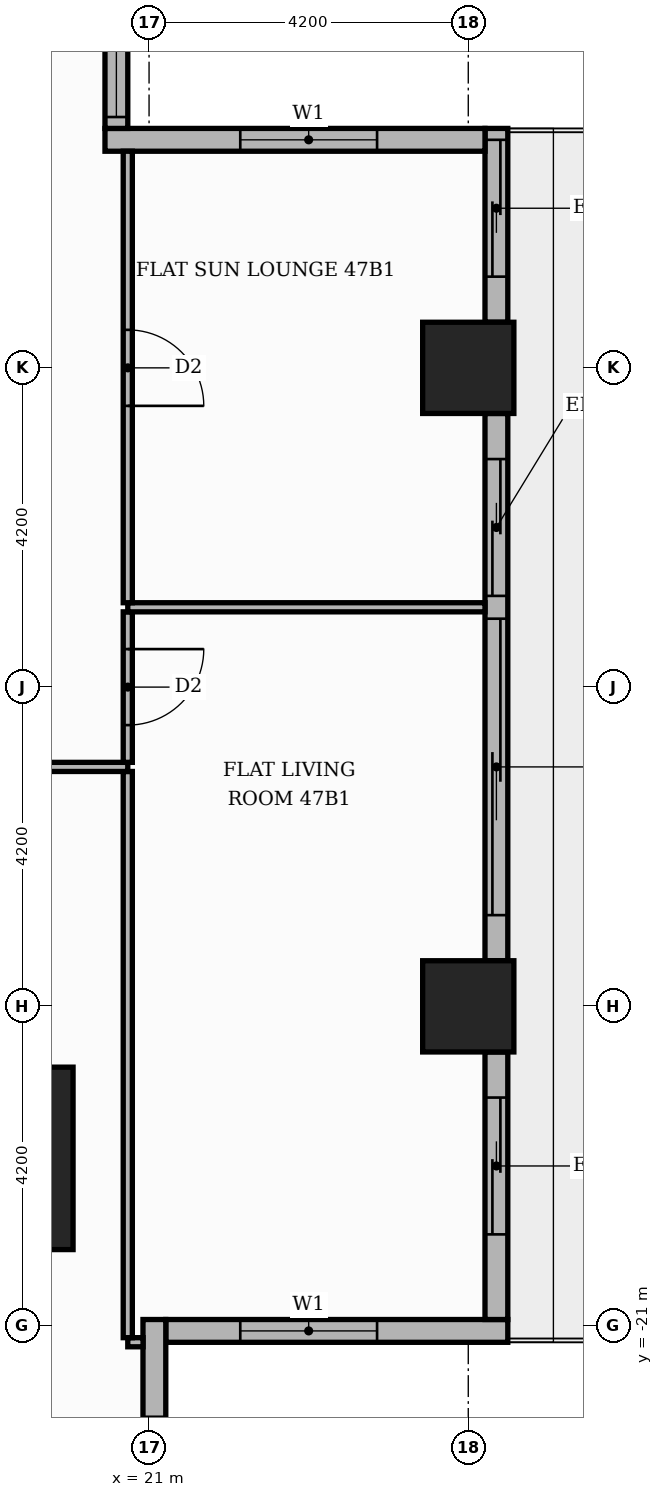
"""IFC4 building model, lengths in metres.
Left out: names, types, materials, properties, quantities, classifications, styles, units other than length and angle.
Written with IfcOpenShell. Run it as: python <this file> out.ifc"""

import sys

from ifc_helpers import new_model, si_unit, direction, frame, frame_2d, origin, origin_2d, place, context, subcontext, project, spatial, rectangle, extrude, element, fill, save


model = new_model("IFC4")
c1 = context("Model", 3, precision=1e-05, world=origin(), true_north=direction((0.0, 1.0)))
c2 = subcontext(c1, "Body", "Model", "MODEL_VIEW")
j1 = project(units=[si_unit("LENGTHUNIT", "METRE"), si_unit("PLANEANGLEUNIT", "RADIAN")], contexts=[c1])
p1 = place(None, origin())
s1 = spatial("IfcSite", under=j1, at=p1, CompositionType="ELEMENT")
p2 = place(p1, origin())
s2 = spatial("IfcBuilding", under=s1, at=p2, CompositionType="ELEMENT")
p3 = place(p2, frame((0.0, 0.0, 200.1)))
s3 = spatial("IfcBuildingStorey", under=s2, at=p3, CompositionType="ELEMENT", Elevation=200.1)
p4 = place(p3, frame((18.8, -18.8, 0.0), z_axis=(0.0, 0.0, 1.0), x_axis=(1.0, 0.0, 0.0)))
e1 = element("IfcColumn", 1, at=p4, inside=s3, PredefinedType="COLUMN", context=c2, shape_type="SweptSolid", body=[
    extrude(rectangle(XDim=2.4, YDim=2.4, at=origin_2d()), origin(), (0.0, 0.0, 1.0), 3.9),
])
for number, where, z_axis, x_axis in (
    (2, (25.2, -8.4, 0.0), (0.0, 0.0, 1.0), (1.0, 0.0, 0.0)),
    (3, (25.2, -16.8, 0.0), (0.0, 0.0, 1.0), (1.0, 0.0, 0.0)),
):
    element("IfcColumn", number, at=place(p3, frame(where, z_axis=z_axis, x_axis=x_axis)), inside=s3, PredefinedType="COLUMN", context=c2, shape_type="SweptSolid", body=[
        extrude(rectangle(XDim=1.2, YDim=1.2, at=origin_2d()), origin(), (0.0, 0.0, 1.0), 3.9),
    ])
p5 = place(p3, frame((21.22, -21.07, 0.0), z_axis=(0.0, 0.0, 1.0), x_axis=(1.0, 0.0, 0.0)))
e4 = element("IfcWall", 4, at=p5, inside=s3, PredefinedType="STANDARD", context=c2, shape_type="SweptSolid", body=[
    extrude(rectangle(XDim=4.5, YDim=0.3, at=frame_2d((2.25, 0.0))), origin(), (0.0, 0.0, 1.0), 3.48),
])
p6 = place(p5, frame((0.98, 0.0, 0.9)))
e5 = element("IfcOpeningElement", 5, at=p6, cuts=e4, PredefinedType="OPENING", context=c2, shape_type="SweptSolid", body=[
    extrude(rectangle(XDim=1.8, YDim=2.1, at=frame_2d((0.9, 1.05))), frame((0.0, 0.16, 0.0), z_axis=(0.0, -1.0, 0.0), x_axis=(1.0, 0.0, 0.0)), (0.0, 0.0, 1.0), 0.32),
])
p7 = place(p3, frame((25.57, -20.92, 0.0), z_axis=(0.0, 0.0, 1.0), x_axis=(0.0, 1.0, 0.0)))
e6 = element("IfcWall", 6, at=p7, inside=s3, PredefinedType="STANDARD", context=c2, shape_type="SweptSolid", body=[
    extrude(rectangle(XDim=3.52, YDim=0.3, at=frame_2d((1.76, 0.0))), origin(), (0.0, 0.0, 1.0), 3.48),
])
p8 = place(p7, frame((1.12, 0.0, 0.0)))
e7 = element("IfcOpeningElement", 7, at=p8, cuts=e6, PredefinedType="OPENING", context=c2, shape_type="SweptSolid", body=[
    extrude(rectangle(XDim=1.8, YDim=2.4, at=frame_2d((0.9, 1.2))), frame((0.0, 0.16, 0.0), z_axis=(0.0, -1.0, 0.0), x_axis=(1.0, 0.0, 0.0)), (0.0, 0.0, 1.0), 0.32),
])
p9 = place(p3, frame((25.57, -16.2, 0.0), z_axis=(0.0, 0.0, 1.0), x_axis=(0.0, 1.0, 0.0)))
e8 = element("IfcWall", 8, at=p9, inside=s3, PredefinedType="STANDARD", context=c2, shape_type="SweptSolid", body=[
    extrude(rectangle(XDim=7.2, YDim=0.3, at=frame_2d((3.6, 0.0))), origin(), (0.0, 0.0, 1.0), 3.48),
])
p10 = place(p9, frame((0.6, 0.0, 0.0)))
e9 = element("IfcOpeningElement", 9, at=p10, cuts=e8, PredefinedType="OPENING", context=c2, shape_type="SweptSolid", body=[
    extrude(rectangle(XDim=3.9, YDim=2.4, at=frame_2d((1.95, 1.2))), frame((0.0, 0.16, 0.0), z_axis=(0.0, -1.0, 0.0), x_axis=(1.0, 0.0, 0.0)), (0.0, 0.0, 1.0), 0.32),
])
p11 = place(p9, frame((4.8, 0.0, 0.0)))
e10 = element("IfcOpeningElement", 10, at=p11, cuts=e8, PredefinedType="OPENING", context=c2, shape_type="SweptSolid", body=[
    extrude(rectangle(XDim=1.8, YDim=2.4, at=frame_2d((0.9, 1.2))), frame((0.0, 0.16, 0.0), z_axis=(0.0, -1.0, 0.0), x_axis=(1.0, 0.0, 0.0)), (0.0, 0.0, 1.0), 0.32),
])
p12 = place(p3, frame((25.57, -7.8, 0.0), z_axis=(0.0, 0.0, 1.0), x_axis=(0.0, 1.0, 0.0)))
e11 = element("IfcWall", 11, at=p12, inside=s3, PredefinedType="STANDARD", context=c2, shape_type="SweptSolid", body=[
    extrude(rectangle(XDim=2.55, YDim=0.3, at=frame_2d((1.275, 0.0))), origin(), (0.0, 0.0, 1.0), 3.48),
])
p13 = place(p12, frame((0.6, 0.0, 0.0)))
e12 = element("IfcOpeningElement", 12, at=p13, cuts=e11, PredefinedType="OPENING", context=c2, shape_type="SweptSolid", body=[
    extrude(rectangle(XDim=1.8, YDim=2.4, at=frame_2d((0.9, 1.2))), frame((0.0, 0.16, 0.0), z_axis=(0.0, -1.0, 0.0), x_axis=(1.0, 0.0, 0.0)), (0.0, 0.0, 1.0), 0.32),
])
p14 = place(p3, frame((25.42, -5.4, 0.0), z_axis=(0.0, 0.0, 1.0), x_axis=(-1.0, 0.0, 0.0)))
e13 = element("IfcWall", 13, at=p14, inside=s3, PredefinedType="STANDARD", context=c2, shape_type="SweptSolid", body=[
    extrude(rectangle(XDim=5.0, YDim=0.3, at=frame_2d((2.5, 0.0))), origin(), (0.0, 0.0, 1.0), 3.48),
])
p15 = place(p14, frame((1.42, 0.0, 0.9)))
e14 = element("IfcOpeningElement", 14, at=p15, cuts=e13, PredefinedType="OPENING", context=c2, shape_type="SweptSolid", body=[
    extrude(rectangle(XDim=1.8, YDim=2.1, at=frame_2d((0.9, 1.05))), frame((0.0, 0.16, 0.0), z_axis=(0.0, -1.0, 0.0), x_axis=(1.0, 0.0, 0.0)), (0.0, 0.0, 1.0), 0.32),
])
p16 = place(p3, frame((20.57, -5.25, 0.0), z_axis=(0.0, 0.0, 1.0), x_axis=(0.0, 1.0, 0.0)))
e15 = element("IfcWall", 15, at=p16, inside=s3, PredefinedType="STANDARD", context=c2, shape_type="SweptSolid", body=[
    extrude(rectangle(XDim=10.8, YDim=0.3, at=frame_2d((5.4, 0.0))), origin(), (0.0, 0.0, 1.0), 3.48),
])
p17 = place(p16, frame((0.15, 0.0, 0.9)))
e16 = element("IfcOpeningElement", 16, at=p17, cuts=e15, PredefinedType="OPENING", context=c2, shape_type="SweptSolid", body=[
    extrude(rectangle(XDim=6.0, YDim=2.1, at=frame_2d((3.0, 1.05))), frame((0.0, 0.16, 0.0), z_axis=(0.0, -1.0, 0.0), x_axis=(1.0, 0.0, 0.0)), (0.0, 0.0, 1.0), 0.32),
])
p18 = place(p16, frame((6.45, 0.0, 0.9)))
e17 = element("IfcOpeningElement", 17, at=p18, cuts=e15, PredefinedType="OPENING", context=c2, shape_type="SweptSolid", body=[
    extrude(rectangle(XDim=3.9, YDim=2.1, at=frame_2d((1.95, 1.05))), frame((0.0, 0.16, 0.0), z_axis=(0.0, -1.0, 0.0), x_axis=(1.0, 0.0, 0.0)), (0.0, 0.0, 1.0), 0.32),
])
p19 = place(p3, frame((21.07, -25.42, 0.0), z_axis=(0.0, 0.0, 1.0), x_axis=(0.0, 1.0, 0.0)))
e18 = element("IfcWall", 18, at=p19, inside=s3, PredefinedType="STANDARD", context=c2, shape_type="SweptSolid", body=[
    extrude(rectangle(XDim=4.5, YDim=0.3, at=frame_2d((2.25, 0.0))), origin(), (0.0, 0.0, 1.0), 3.48),
])
p20 = place(p19, frame((1.42, 0.0, 0.9)))
e19 = element("IfcOpeningElement", 19, at=p20, cuts=e18, PredefinedType="OPENING", context=c2, shape_type="SweptSolid", body=[
    extrude(rectangle(XDim=1.8, YDim=2.1, at=frame_2d((0.9, 1.05))), frame((0.0, 0.16, 0.0), z_axis=(0.0, -1.0, 0.0), x_axis=(1.0, 0.0, 0.0)), (0.0, 0.0, 1.0), 0.32),
])
p21 = place(p3, frame((20.72, -21.219, 0.0), z_axis=(0.0, 0.0, 1.0), x_axis=(1.0, 0.0, 0.0)))
e20 = element("IfcWall", 20, at=p21, inside=s3, PredefinedType="PARTITIONING", context=c2, shape_type="SweptSolid", body=[
    extrude(rectangle(XDim=0.201, YDim=0.12, at=frame_2d((0.101, 0.0))), origin(), (0.0, 0.0, 1.0), 3.48),
])
p22 = place(p3, frame((20.72, -21.159, 0.0), z_axis=(0.0, 0.0, 1.0), x_axis=(0.0, 1.0, 0.0)))
e21 = element("IfcWall", 21, at=p22, inside=s3, PredefinedType="PARTITIONING", context=c2, shape_type="SweptSolid", body=[
    extrude(rectangle(XDim=7.449, YDim=0.12, at=frame_2d((3.725, 0.0))), origin(), (0.0, 0.0, 1.0), 3.48),
])
p23 = place(p3, frame((13.65, -13.65, 0.0), z_axis=(0.0, 0.0, 1.0), x_axis=(1.0, 0.0, 0.0)))
e22 = element("IfcWall", 22, at=p23, inside=s3, PredefinedType="PARTITIONING", context=c2, shape_type="SweptSolid", body=[
    extrude(rectangle(XDim=7.07, YDim=0.12, at=frame_2d((3.535, 0.0))), origin(), (0.0, 0.0, 1.0), 3.48),
])
p24 = place(p23, frame((3.085, 0.0, 0.0)))
e23 = element("IfcOpeningElement", 23, at=p24, cuts=e22, PredefinedType="OPENING", context=c2, shape_type="SweptSolid", body=[
    extrude(rectangle(XDim=0.9, YDim=2.1, at=frame_2d((0.45, 1.05))), frame((0.0, 0.07, 0.0), z_axis=(0.0, -1.0, 0.0), x_axis=(1.0, 0.0, 0.0)), (0.0, 0.0, 1.0), 0.14),
])
p25 = place(p3, frame((20.72, -13.59, 0.0), z_axis=(0.0, 0.0, 1.0), x_axis=(0.0, 1.0, 0.0)))
e24 = element("IfcWall", 24, at=p25, inside=s3, PredefinedType="PARTITIONING", context=c2, shape_type="SweptSolid", body=[
    extrude(rectangle(XDim=1.98, YDim=0.12, at=frame_2d((0.99, 0.0))), origin(), (0.0, 0.0, 1.0), 3.48),
])
p26 = place(p25, frame((0.49, 0.0, 0.0)))
e25 = element("IfcOpeningElement", 25, at=p26, cuts=e24, PredefinedType="OPENING", context=c2, shape_type="SweptSolid", body=[
    extrude(rectangle(XDim=1.0, YDim=2.1, at=frame_2d((0.5, 1.05))), frame((0.0, 0.07, 0.0), z_axis=(0.0, -1.0, 0.0), x_axis=(1.0, 0.0, 0.0)), (0.0, 0.0, 1.0), 0.14),
])
p27 = place(p3, frame((20.72, -11.55, 0.0), z_axis=(0.0, 0.0, 1.0), x_axis=(1.0, 0.0, 0.0)))
e26 = element("IfcWall", 26, at=p27, inside=s3, PredefinedType="PARTITIONING", context=c2, shape_type="SweptSolid", body=[
    extrude(rectangle(XDim=4.7, YDim=0.12, at=frame_2d((2.35, 0.0))), origin(), (0.0, 0.0, 1.0), 3.48),
])
p28 = place(p3, frame((20.72, -11.49, 0.0), z_axis=(0.0, 0.0, 1.0), x_axis=(0.0, 1.0, 0.0)))
e27 = element("IfcWall", 27, at=p28, inside=s3, PredefinedType="PARTITIONING", context=c2, shape_type="SweptSolid", body=[
    extrude(rectangle(XDim=5.94, YDim=0.12, at=frame_2d((2.97, 0.0))), origin(), (0.0, 0.0, 1.0), 3.48),
])
p29 = place(p28, frame((2.59, 0.0, 0.0)))
e28 = element("IfcOpeningElement", 28, at=p29, cuts=e27, PredefinedType="OPENING", context=c2, shape_type="SweptSolid", body=[
    extrude(rectangle(XDim=1.0, YDim=2.1, at=frame_2d((0.5, 1.05))), frame((0.0, 0.07, 0.0), z_axis=(0.0, -1.0, 0.0), x_axis=(1.0, 0.0, 0.0)), (0.0, 0.0, 1.0), 0.14),
])
p30 = place(p6, origin())
e29 = element("IfcWindow", 29, at=p30, inside=s3, PartitioningType="SINGLE_PANEL", PredefinedType="WINDOW", context=c2, shape_type="SweptSolid", body=[
    extrude(rectangle(XDim=1.8, YDim=2.1, at=frame_2d((0.9, 1.05))), frame((0.0, 0.03, 0.0), z_axis=(0.0, -1.0, 0.0), x_axis=(1.0, 0.0, 0.0)), (0.0, 0.0, 1.0), 0.06),
])
fill(e5, e29)
p31 = place(p8, origin())
e30 = element("IfcDoor", 30, at=p31, inside=s3, OperationType="SLIDING_TO_RIGHT", PredefinedType="DOOR", context=c2, shape_type="SweptSolid", body=[
    extrude(rectangle(XDim=1.8, YDim=2.4, at=frame_2d((0.9, 1.2))), frame((0.0, 0.025, 0.0), z_axis=(0.0, -1.0, 0.0), x_axis=(1.0, 0.0, 0.0)), (0.0, 0.0, 1.0), 0.05),
])
fill(e7, e30)
p32 = place(p10, origin())
e31 = element("IfcDoor", 31, at=p32, inside=s3, OperationType="SLIDING_TO_LEFT", PredefinedType="DOOR", context=c2, shape_type="SweptSolid", body=[
    extrude(rectangle(XDim=3.9, YDim=2.4, at=frame_2d((1.95, 1.2))), frame((0.0, 0.025, 0.0), z_axis=(0.0, -1.0, 0.0), x_axis=(1.0, 0.0, 0.0)), (0.0, 0.0, 1.0), 0.05),
])
fill(e9, e31)
p33 = place(p11, origin())
e32 = element("IfcDoor", 32, at=p33, inside=s3, OperationType="SLIDING_TO_RIGHT", PredefinedType="DOOR", context=c2, shape_type="SweptSolid", body=[
    extrude(rectangle(XDim=1.8, YDim=2.4, at=frame_2d((0.9, 1.2))), frame((0.0, 0.025, 0.0), z_axis=(0.0, -1.0, 0.0), x_axis=(1.0, 0.0, 0.0)), (0.0, 0.0, 1.0), 0.05),
])
fill(e10, e32)
p34 = place(p13, origin())
e33 = element("IfcDoor", 33, at=p34, inside=s3, OperationType="SLIDING_TO_LEFT", PredefinedType="DOOR", context=c2, shape_type="SweptSolid", body=[
    extrude(rectangle(XDim=1.8, YDim=2.4, at=frame_2d((0.9, 1.2))), frame((0.0, 0.025, 0.0), z_axis=(0.0, -1.0, 0.0), x_axis=(1.0, 0.0, 0.0)), (0.0, 0.0, 1.0), 0.05),
])
fill(e12, e33)
p35 = place(p15, origin())
e34 = element("IfcWindow", 34, at=p35, inside=s3, PartitioningType="SINGLE_PANEL", PredefinedType="WINDOW", context=c2, shape_type="SweptSolid", body=[
    extrude(rectangle(XDim=1.8, YDim=2.1, at=frame_2d((0.9, 1.05))), frame((0.0, 0.03, 0.0), z_axis=(0.0, -1.0, 0.0), x_axis=(1.0, 0.0, 0.0)), (0.0, 0.0, 1.0), 0.06),
])
fill(e14, e34)
p36 = place(p17, origin())
e35 = element("IfcWindow", 35, at=p36, inside=s3, PartitioningType="SINGLE_PANEL", PredefinedType="WINDOW", context=c2, shape_type="SweptSolid", body=[
    extrude(rectangle(XDim=6.0, YDim=2.1, at=frame_2d((3.0, 1.05))), frame((0.0, 0.03, 0.0), z_axis=(0.0, -1.0, 0.0), x_axis=(1.0, 0.0, 0.0)), (0.0, 0.0, 1.0), 0.06),
])
fill(e16, e35)
p37 = place(p20, origin())
e36 = element("IfcWindow", 36, at=p37, inside=s3, PartitioningType="SINGLE_PANEL", PredefinedType="WINDOW", context=c2, shape_type="SweptSolid", body=[
    extrude(rectangle(XDim=1.8, YDim=2.1, at=frame_2d((0.9, 1.05))), frame((0.0, 0.03, 0.0), z_axis=(0.0, -1.0, 0.0), x_axis=(1.0, 0.0, 0.0)), (0.0, 0.0, 1.0), 0.06),
])
fill(e19, e36)
p38 = place(p26, frame((1.0, 0.0, 0.0), z_axis=(0.0, 0.0, 1.0), x_axis=(-1.0, 0.0, 0.0)))
e37 = element("IfcDoor", 37, at=p38, inside=s3, OperationType="SINGLE_SWING_RIGHT", PredefinedType="DOOR", context=c2, shape_type="SweptSolid", body=[
    extrude(rectangle(XDim=1.0, YDim=2.1, at=frame_2d((0.5, 1.05))), frame((0.0, 0.025, 0.0), z_axis=(0.0, -1.0, 0.0), x_axis=(1.0, 0.0, 0.0)), (0.0, 0.0, 1.0), 0.05),
])
fill(e25, e37)
p39 = place(p29, frame((1.0, 0.0, 0.0), z_axis=(0.0, 0.0, 1.0), x_axis=(-1.0, 0.0, 0.0)))
e38 = element("IfcDoor", 38, at=p39, inside=s3, OperationType="SINGLE_SWING_LEFT", PredefinedType="DOOR", context=c2, shape_type="SweptSolid", body=[
    extrude(rectangle(XDim=1.0, YDim=2.1, at=frame_2d((0.5, 1.05))), frame((0.0, 0.025, 0.0), z_axis=(0.0, -1.0, 0.0), x_axis=(1.0, 0.0, 0.0)), (0.0, 0.0, 1.0), 0.05),
])
fill(e28, e38)
save(model, sys.argv[1])
